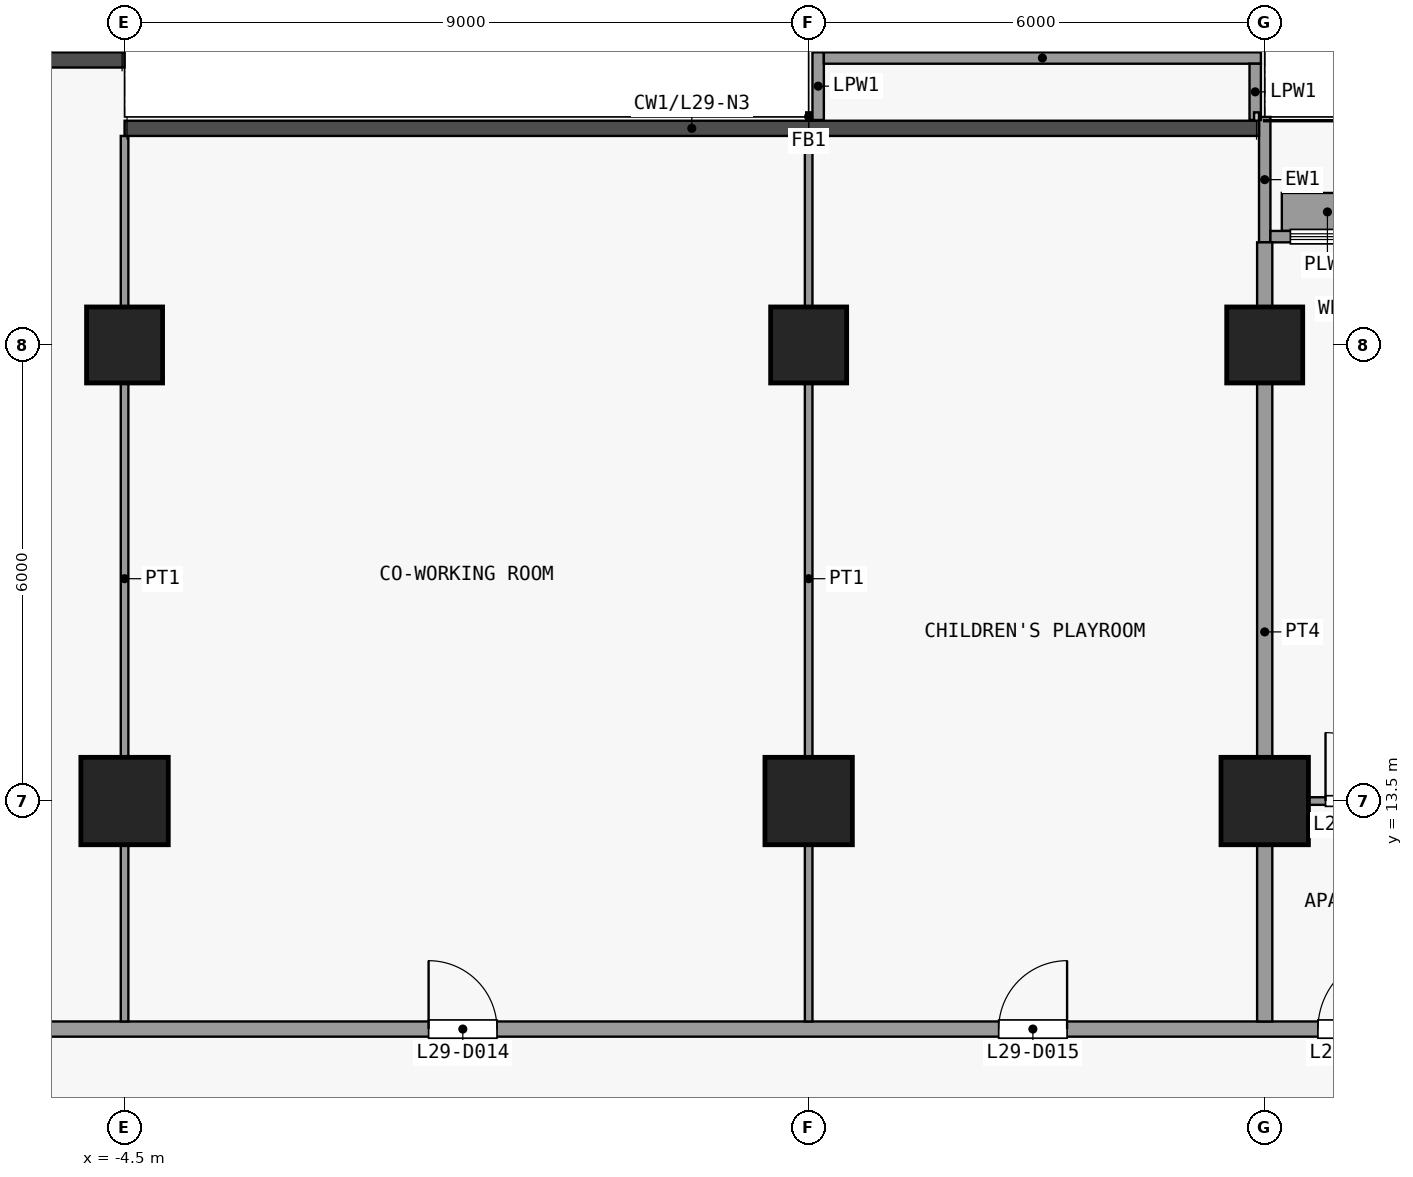
"""IFC4 building model, lengths in metres.
Left out: names, types, materials, properties, quantities, classifications, styles, units other than length and angle.
Written with IfcOpenShell. Run it as: python <this file> out.ifc"""

import sys

from ifc_helpers import new_model, si_unit, direction, frame, frame_2d, origin, origin_2d, place, context, subcontext, project, spatial, rectangle, extrude, element, fill, save


model = new_model("IFC4")
c1 = context("Model", 3, precision=1e-05, world=origin(), true_north=direction((0.0, 1.0)))
c2 = subcontext(c1, "Body", "Model", "MODEL_VIEW")
j1 = project(units=[si_unit("LENGTHUNIT", "METRE"), si_unit("PLANEANGLEUNIT", "RADIAN")], contexts=[c1])
p1 = place(None, origin())
s1 = spatial("IfcSite", under=j1, at=p1, CompositionType="ELEMENT")
p2 = place(p1, origin())
s2 = spatial("IfcBuilding", under=s1, at=p2, CompositionType="ELEMENT")
p3 = place(p2, frame((0.0, 0.0, 117.1)))
s3 = spatial("IfcBuildingStorey", under=s2, at=p3, CompositionType="ELEMENT", Elevation=117.1)
p4 = place(p3, frame((-4.5, 13.5, 0.0), z_axis=(0.0, 0.0, 1.0), x_axis=(1.0, 0.0, 0.0)))
e1 = element("IfcColumn", 1, at=p4, inside=s3, PredefinedType="COLUMN", context=c2, shape_type="SweptSolid", body=[
    extrude(rectangle(XDim=1.15, YDim=1.15, at=origin_2d()), origin(), (0.0, 0.0, 1.0), 3.6),
])
p5 = place(p3, frame((-4.5, 19.5, 0.0), z_axis=(0.0, 0.0, 1.0), x_axis=(1.0, 0.0, 0.0)))
e2 = element("IfcColumn", 2, at=p5, inside=s3, PredefinedType="COLUMN", context=c2, shape_type="SweptSolid", body=[
    extrude(rectangle(XDim=1.0, YDim=1.0, at=origin_2d()), origin(), (0.0, 0.0, 1.0), 3.6),
])
p6 = place(p3, frame((4.5, 13.5, 0.0), z_axis=(0.0, 0.0, 1.0), x_axis=(1.0, 0.0, 0.0)))
e3 = element("IfcColumn", 3, at=p6, inside=s3, PredefinedType="COLUMN", context=c2, shape_type="SweptSolid", body=[
    extrude(rectangle(XDim=1.15, YDim=1.15, at=origin_2d()), origin(), (0.0, 0.0, 1.0), 3.6),
])
p7 = place(p3, frame((4.5, 19.5, 0.0), z_axis=(0.0, 0.0, 1.0), x_axis=(1.0, 0.0, 0.0)))
e4 = element("IfcColumn", 4, at=p7, inside=s3, PredefinedType="COLUMN", context=c2, shape_type="SweptSolid", body=[
    extrude(rectangle(XDim=1.0, YDim=1.0, at=origin_2d()), origin(), (0.0, 0.0, 1.0), 3.6),
])
p8 = place(p3, frame((10.5, 13.5, 0.0), z_axis=(0.0, 0.0, 1.0), x_axis=(1.0, 0.0, 0.0)))
e5 = element("IfcColumn", 5, at=p8, inside=s3, PredefinedType="COLUMN", context=c2, shape_type="SweptSolid", body=[
    extrude(rectangle(XDim=1.15, YDim=1.15, at=origin_2d()), origin(), (0.0, 0.0, 1.0), 3.6),
])
p9 = place(p3, frame((10.5, 19.5, 0.0), z_axis=(0.0, 0.0, 1.0), x_axis=(1.0, 0.0, 0.0)))
e6 = element("IfcColumn", 6, at=p9, inside=s3, PredefinedType="COLUMN", context=c2, shape_type="SweptSolid", body=[
    extrude(rectangle(XDim=1.0, YDim=1.0, at=origin_2d()), origin(), (0.0, 0.0, 1.0), 3.6),
])
p10 = place(p3, frame((10.5, 20.85, 0.0), z_axis=(0.0, 0.0, 1.0), x_axis=(0.0, 1.0, 0.0)))
e7 = element("IfcWall", 7, at=p10, inside=s3, PredefinedType="SOLIDWALL", context=c2, shape_type="SweptSolid", body=[
    extrude(rectangle(XDim=1.65, YDim=0.15, at=frame_2d((0.825, 0.0))), origin(), (0.0, 0.0, 1.0), 3.3),
])
p11 = place(p3, frame((10.575, 20.925, 0.0), z_axis=(0.0, 0.0, 1.0), x_axis=(1.0, 0.0, 0.0)))
e8 = element("IfcWall", 8, at=p11, inside=s3, PredefinedType="SOLIDWALL", context=c2, shape_type="SweptSolid", body=[
    extrude(rectangle(XDim=5.85, YDim=0.15, at=frame_2d((2.925, 0.0))), origin(), (0.0, 0.0, 1.0), 3.3),
])
p12 = place(p11, frame((2.325, 0.0, 0.0)))
e9 = element("IfcOpeningElement", 9, at=p12, cuts=e8, PredefinedType="OPENING", context=c2, shape_type="SweptSolid", body=[
    extrude(rectangle(XDim=1.2, YDim=2.4, at=frame_2d((0.6, 1.2))), frame((0.0, 0.085, 0.0), z_axis=(0.0, -1.0, 0.0), x_axis=(1.0, 0.0, 0.0)), (0.0, 0.0, 1.0), 0.17),
])
p13 = place(p11, frame((0.262, 0.0, 0.9)))
e10 = element("IfcOpeningElement", 10, at=p13, cuts=e8, PredefinedType="OPENING", context=c2, shape_type="SweptSolid", body=[
    extrude(rectangle(XDim=1.8, YDim=2.1, at=frame_2d((0.9, 1.05))), frame((0.0, 0.085, 0.0), z_axis=(0.0, -1.0, 0.0), x_axis=(1.0, 0.0, 0.0)), (0.0, 0.0, 1.0), 0.17),
])
p14 = place(p11, frame((3.788, 0.0, 0.9)))
e11 = element("IfcOpeningElement", 11, at=p14, cuts=e8, PredefinedType="OPENING", context=c2, shape_type="SweptSolid", body=[
    extrude(rectangle(XDim=1.8, YDim=2.1, at=frame_2d((0.9, 1.05))), frame((0.0, 0.085, 0.0), z_axis=(0.0, -1.0, 0.0), x_axis=(1.0, 0.0, 0.0)), (0.0, 0.0, 1.0), 0.17),
])
p15 = place(p3, frame((10.725, 21.25, 0.0), z_axis=(0.0, 0.0, 1.0), x_axis=(1.0, 0.0, 0.0)))
e12 = element("IfcWall", 12, at=p15, inside=s3, PredefinedType="USERDEFINED", context=c2, shape_type="SweptSolid", body=[
    extrude(rectangle(XDim=1.2, YDim=0.5, at=frame_2d((0.6, 0.0))), origin(), (0.0, 0.0, 1.0), 0.9),
])
p16 = place(p3, frame((4.625, 22.46, 0.0), z_axis=(0.0, 0.0, 1.0), x_axis=(0.0, 1.0, 0.0)))
e13 = element("IfcWall", 13, at=p16, inside=s3, PredefinedType="PARAPET", context=c2, shape_type="SweptSolid", body=[
    extrude(rectangle(XDim=0.89, YDim=0.15, at=frame_2d((0.445, 0.0))), origin(), (0.0, 0.0, 1.0), 1.15),
])
p17 = place(p3, frame((4.7, 23.275, 0.0), z_axis=(0.0, 0.0, 1.0), x_axis=(1.0, 0.0, 0.0)))
e14 = element("IfcWall", 14, at=p17, inside=s3, PredefinedType="PARAPET", context=c2, shape_type="SweptSolid", body=[
    extrude(rectangle(XDim=5.75, YDim=0.15, at=frame_2d((2.875, 0.0))), origin(), (0.0, 0.0, 1.0), 1.15),
])
p18 = place(p3, frame((10.375, 23.2, 0.0), z_axis=(0.0, 0.0, 1.0), x_axis=(0.0, -1.0, 0.0)))
e15 = element("IfcWall", 15, at=p18, inside=s3, PredefinedType="PARAPET", context=c2, shape_type="SweptSolid", body=[
    extrude(rectangle(XDim=0.74, YDim=0.15, at=frame_2d((0.37, 0.0))), origin(), (0.0, 0.0, 1.0), 1.15),
])
p19 = place(p3, frame((-25.35, 10.5, 0.0), z_axis=(0.0, 0.0, 1.0), x_axis=(1.0, 0.0, 0.0)))
e16 = element("IfcWall", 16, at=p19, inside=s3, PredefinedType="PARTITIONING", context=c2, shape_type="SweptSolid", body=[
    extrude(rectangle(XDim=50.7, YDim=0.2, at=frame_2d((25.35, 0.0))), origin(), (0.0, 0.0, 1.0), 3.3),
])
p20 = place(p19, frame((10.55, 0.0, 0.0)))
e17 = element("IfcOpeningElement", 17, at=p20, cuts=e16, PredefinedType="OPENING", context=c2, shape_type="SweptSolid", body=[
    extrude(rectangle(XDim=1.0, YDim=2.1, at=frame_2d((0.5, 1.05))), frame((0.0, 0.11, 0.0), z_axis=(0.0, -1.0, 0.0), x_axis=(1.0, 0.0, 0.0)), (0.0, 0.0, 1.0), 0.22),
])
p21 = place(p19, frame((17.35, 0.0, 0.0)))
e18 = element("IfcOpeningElement", 18, at=p21, cuts=e16, PredefinedType="OPENING", context=c2, shape_type="SweptSolid", body=[
    extrude(rectangle(XDim=0.9, YDim=2.1, at=frame_2d((0.45, 1.05))), frame((0.0, 0.11, 0.0), z_axis=(0.0, -1.0, 0.0), x_axis=(1.0, 0.0, 0.0)), (0.0, 0.0, 1.0), 0.22),
])
p22 = place(p19, frame((24.85, 0.0, 0.0)))
e19 = element("IfcOpeningElement", 19, at=p22, cuts=e16, PredefinedType="OPENING", context=c2, shape_type="SweptSolid", body=[
    extrude(rectangle(XDim=0.9, YDim=2.1, at=frame_2d((0.45, 1.05))), frame((0.0, 0.11, 0.0), z_axis=(0.0, -1.0, 0.0), x_axis=(1.0, 0.0, 0.0)), (0.0, 0.0, 1.0), 0.22),
])
p23 = place(p19, frame((32.35, 0.0, 0.0)))
e20 = element("IfcOpeningElement", 20, at=p23, cuts=e16, PredefinedType="OPENING", context=c2, shape_type="SweptSolid", body=[
    extrude(rectangle(XDim=0.9, YDim=2.1, at=frame_2d((0.45, 1.05))), frame((0.0, 0.11, 0.0), z_axis=(0.0, -1.0, 0.0), x_axis=(1.0, 0.0, 0.0)), (0.0, 0.0, 1.0), 0.22),
])
p24 = place(p19, frame((36.55, 0.0, 0.0)))
e21 = element("IfcOpeningElement", 21, at=p24, cuts=e16, PredefinedType="OPENING", context=c2, shape_type="SweptSolid", body=[
    extrude(rectangle(XDim=1.0, YDim=2.1, at=frame_2d((0.5, 1.05))), frame((0.0, 0.11, 0.0), z_axis=(0.0, -1.0, 0.0), x_axis=(1.0, 0.0, 0.0)), (0.0, 0.0, 1.0), 0.22),
])
p25 = place(p19, frame((45.05, 0.0, 0.0)))
e22 = element("IfcOpeningElement", 22, at=p25, cuts=e16, PredefinedType="OPENING", context=c2, shape_type="SweptSolid", body=[
    extrude(rectangle(XDim=1.0, YDim=2.1, at=frame_2d((0.5, 1.05))), frame((0.0, 0.11, 0.0), z_axis=(0.0, -1.0, 0.0), x_axis=(1.0, 0.0, 0.0)), (0.0, 0.0, 1.0), 0.22),
])
p26 = place(p3, frame((10.6, 13.5, 0.0), z_axis=(0.0, 0.0, 1.0), x_axis=(1.0, 0.0, 0.0)))
e23 = element("IfcWall", 23, at=p26, inside=s3, PredefinedType="PARTITIONING", context=c2, shape_type="SweptSolid", body=[
    extrude(rectangle(XDim=2.3, YDim=0.1, at=frame_2d((1.15, 0.0))), origin(), (0.0, 0.0, 1.0), 3.3),
])
p27 = place(p26, frame((0.7, 0.0, 0.0)))
e24 = element("IfcOpeningElement", 24, at=p27, cuts=e23, PredefinedType="OPENING", context=c2, shape_type="SweptSolid", body=[
    extrude(rectangle(XDim=0.9, YDim=2.1, at=frame_2d((0.45, 1.05))), frame((0.0, 0.06, 0.0), z_axis=(0.0, -1.0, 0.0), x_axis=(1.0, 0.0, 0.0)), (0.0, 0.0, 1.0), 0.12),
])
for number, where, z_axis, x_axis in (
    (25, (-4.5, 10.6, 0.0), (0.0, 0.0, 1.0), (0.0, 1.0, 0.0)),
    (26, (4.5, 10.6, 0.0), (0.0, 0.0, 1.0), (0.0, 1.0, 0.0)),
):
    element("IfcWall", number, at=place(p3, frame(where, z_axis=z_axis, x_axis=x_axis)), inside=s3, PredefinedType="PARTITIONING", context=c2, shape_type="SweptSolid", body=[
        extrude(rectangle(XDim=11.65, YDim=0.1, at=frame_2d((5.825, 0.0))), origin(), (0.0, 0.0, 1.0), 3.3),
    ])
p28 = place(p3, frame((10.5, 10.6, 0.0), z_axis=(0.0, 0.0, 1.0), x_axis=(0.0, 1.0, 0.0)))
e27 = element("IfcWall", 27, at=p28, inside=s3, PredefinedType="PARTITIONING", context=c2, shape_type="SweptSolid", body=[
    extrude(rectangle(XDim=10.25, YDim=0.2, at=frame_2d((5.125, 0.0))), origin(), (0.0, 0.0, 1.0), 3.3),
])
p29 = place(p13, origin())
e28 = element("IfcWindow", 28, at=p29, inside=s3, PartitioningType="SINGLE_PANEL", PredefinedType="WINDOW", context=c2, shape_type="SweptSolid", body=[
    extrude(rectangle(XDim=1.8, YDim=2.1, at=frame_2d((0.9, 1.05))), frame((0.0, 0.03, 0.0), z_axis=(0.0, -1.0, 0.0), x_axis=(1.0, 0.0, 0.0)), (0.0, 0.0, 1.0), 0.06),
])
fill(e10, e28)
p30 = place(p22, origin())
e29 = element("IfcDoor", 29, at=p30, inside=s3, OperationType="SINGLE_SWING_RIGHT", PredefinedType="DOOR", context=c2, shape_type="SweptSolid", body=[
    extrude(rectangle(XDim=0.9, YDim=2.1, at=frame_2d((0.45, 1.05))), frame((0.0, 0.025, 0.0), z_axis=(0.0, -1.0, 0.0), x_axis=(1.0, 0.0, 0.0)), (0.0, 0.0, 1.0), 0.05),
])
fill(e19, e29)
p31 = place(p23, origin())
e30 = element("IfcDoor", 30, at=p31, inside=s3, OperationType="SINGLE_SWING_LEFT", PredefinedType="DOOR", context=c2, shape_type="SweptSolid", body=[
    extrude(rectangle(XDim=0.9, YDim=2.1, at=frame_2d((0.45, 1.05))), frame((0.0, 0.025, 0.0), z_axis=(0.0, -1.0, 0.0), x_axis=(1.0, 0.0, 0.0)), (0.0, 0.0, 1.0), 0.05),
])
fill(e20, e30)
p32 = place(p24, origin())
e31 = element("IfcDoor", 31, at=p32, inside=s3, OperationType="SINGLE_SWING_LEFT", PredefinedType="DOOR", context=c2, shape_type="SweptSolid", body=[
    extrude(rectangle(XDim=1.0, YDim=2.1, at=frame_2d((0.5, 1.05))), frame((0.0, 0.025, 0.0), z_axis=(0.0, -1.0, 0.0), x_axis=(1.0, 0.0, 0.0)), (0.0, 0.0, 1.0), 0.05),
])
fill(e21, e31)
p33 = place(p27, origin())
e32 = element("IfcDoor", 32, at=p33, inside=s3, OperationType="SINGLE_SWING_RIGHT", PredefinedType="DOOR", context=c2, shape_type="SweptSolid", body=[
    extrude(rectangle(XDim=0.9, YDim=2.1, at=frame_2d((0.45, 1.05))), frame((0.0, 0.025, 0.0), z_axis=(0.0, -1.0, 0.0), x_axis=(1.0, 0.0, 0.0)), (0.0, 0.0, 1.0), 0.05),
])
fill(e24, e32)
save(model, sys.argv[1])
